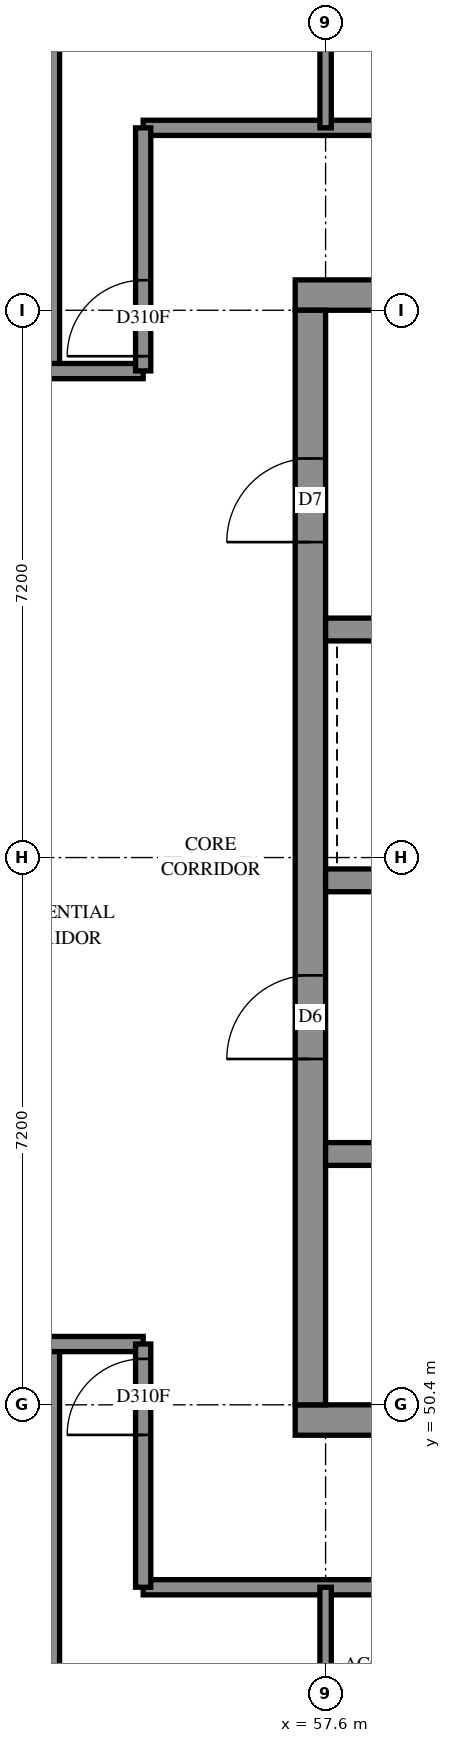
"""IFC4 building model, lengths in metres.
Left out: names, types, materials, properties, quantities, classifications, styles, units other than length and angle.
Written with IfcOpenShell. Run it as: python <this file> out.ifc"""

import sys

from ifc_helpers import new_model, si_unit, direction, frame, frame_2d, origin, place, context, subcontext, project, spatial, rectangle, extrude, element, fill, save


model = new_model("IFC4")
c1 = context("Model", 3, precision=1e-05, world=origin(), true_north=direction((0.0, 1.0)))
c2 = subcontext(c1, "Body", "Model", "MODEL_VIEW")
j1 = project(units=[si_unit("LENGTHUNIT", "METRE"), si_unit("PLANEANGLEUNIT", "RADIAN")], contexts=[c1])
p1 = place(None, origin())
s1 = spatial("IfcSite", under=j1, at=p1, CompositionType="ELEMENT")
p2 = place(p1, origin())
s2 = spatial("IfcBuilding", under=s1, at=p2, CompositionType="ELEMENT")
p3 = place(p2, frame((0.0, 0.0, 281.2)))
s3 = spatial("IfcBuildingStorey", under=s2, at=p3, CompositionType="ELEMENT", Elevation=281.2)
p4 = place(p3, frame((57.2, 50.2, -0.3), z_axis=(0.0, 0.0, 1.0), x_axis=(1.0, 0.0, 0.0)))
e1 = element("IfcWall", 1, at=p4, inside=s3, PredefinedType="SHEAR", context=c2, shape_type="SweptSolid", body=[
    extrude(rectangle(XDim=15.2, YDim=0.4, at=frame_2d((7.6, 0.0))), origin(), (0.0, 0.0, 1.0), 2.7),
])
p5 = place(p3, frame((57.2, 65.0, -0.3), z_axis=(0.0, 0.0, 1.0), x_axis=(1.0, 0.0, 0.0)))
e2 = element("IfcWall", 2, at=p5, inside=s3, PredefinedType="SHEAR", context=c2, shape_type="SweptSolid", body=[
    extrude(rectangle(XDim=15.2, YDim=0.4, at=frame_2d((7.6, 0.0))), origin(), (0.0, 0.0, 1.0), 2.7),
])
p6 = place(p5, frame((10.4, 0.0, 0.3)))
e3 = element("IfcOpeningElement", 3, at=p6, cuts=e2, PredefinedType="OPENING", context=c2, shape_type="SweptSolid", body=[
    extrude(rectangle(XDim=0.8, YDim=2.1, at=frame_2d((0.4, 1.05))), frame((0.0, 0.21, 0.0), z_axis=(0.0, -1.0, 0.0), x_axis=(1.0, 0.0, 0.0)), (0.0, 0.0, 1.0), 0.42),
])
p7 = place(p3, frame((57.4, 50.4, -0.3), z_axis=(0.0, 0.0, 1.0), x_axis=(0.0, 1.0, 0.0)))
e4 = element("IfcWall", 4, at=p7, inside=s3, PredefinedType="SHEAR", context=c2, shape_type="SweptSolid", body=[
    extrude(rectangle(XDim=14.4, YDim=0.4, at=frame_2d((7.2, 0.0))), origin(), (0.0, 0.0, 1.0), 2.7),
])
p8 = place(p7, frame((4.55, 0.0, 0.3)))
e5 = element("IfcOpeningElement", 5, at=p8, cuts=e4, PredefinedType="OPENING", context=c2, shape_type="SweptSolid", body=[
    extrude(rectangle(XDim=1.1, YDim=2.1, at=frame_2d((0.55, 1.05))), frame((0.0, 0.21, 0.0), z_axis=(0.0, -1.0, 0.0), x_axis=(1.0, 0.0, 0.0)), (0.0, 0.0, 1.0), 0.42),
])
p9 = place(p7, frame((11.35, 0.0, 0.3)))
e6 = element("IfcOpeningElement", 6, at=p9, cuts=e4, PredefinedType="OPENING", context=c2, shape_type="SweptSolid", body=[
    extrude(rectangle(XDim=1.1, YDim=2.1, at=frame_2d((0.55, 1.05))), frame((0.0, 0.21, 0.0), z_axis=(0.0, -1.0, 0.0), x_axis=(1.0, 0.0, 0.0)), (0.0, 0.0, 1.0), 0.42),
])
p10 = place(p3, frame((57.6, 53.7, 0.0), z_axis=(0.0, 0.0, 1.0), x_axis=(1.0, 0.0, 0.0)))
e7 = element("IfcWall", 7, at=p10, inside=s3, PredefinedType="SOLIDWALL", context=c2, shape_type="SweptSolid", body=[
    extrude(rectangle(XDim=14.4, YDim=0.3, at=frame_2d((7.2, 0.0))), origin(), (0.0, 0.0, 1.0), 3.1),
])
p11 = place(p10, frame((1.35, 0.0, 0.0)))
e8 = element("IfcOpeningElement", 8, at=p11, cuts=e7, PredefinedType="OPENING", context=c2, shape_type="SweptSolid", body=[
    extrude(rectangle(XDim=0.9, YDim=2.1, at=frame_2d((0.45, 1.05))), frame((0.0, 0.16, 0.0), z_axis=(0.0, -1.0, 0.0), x_axis=(1.0, 0.0, 0.0)), (0.0, 0.0, 1.0), 0.32),
])
p12 = place(p10, frame((4.95, 0.0, 0.0)))
e9 = element("IfcOpeningElement", 9, at=p12, cuts=e7, PredefinedType="OPENING", context=c2, shape_type="SweptSolid", body=[
    extrude(rectangle(XDim=0.9, YDim=2.1, at=frame_2d((0.45, 1.05))), frame((0.0, 0.16, 0.0), z_axis=(0.0, -1.0, 0.0), x_axis=(1.0, 0.0, 0.0)), (0.0, 0.0, 1.0), 0.32),
])
p13 = place(p10, frame((8.55, 0.0, 0.0)))
e10 = element("IfcOpeningElement", 10, at=p13, cuts=e7, PredefinedType="OPENING", context=c2, shape_type="SweptSolid", body=[
    extrude(rectangle(XDim=0.9, YDim=2.1, at=frame_2d((0.45, 1.05))), frame((0.0, 0.16, 0.0), z_axis=(0.0, -1.0, 0.0), x_axis=(1.0, 0.0, 0.0)), (0.0, 0.0, 1.0), 0.32),
])
p14 = place(p10, frame((12.05, 0.0, 0.0)))
e11 = element("IfcOpeningElement", 11, at=p14, cuts=e7, PredefinedType="OPENING", context=c2, shape_type="SweptSolid", body=[
    extrude(rectangle(XDim=1.1, YDim=2.1, at=frame_2d((0.55, 1.05))), frame((0.0, 0.16, 0.0), z_axis=(0.0, -1.0, 0.0), x_axis=(1.0, 0.0, 0.0)), (0.0, 0.0, 1.0), 0.32),
])
p15 = place(p3, frame((57.6, 57.3, 0.0), z_axis=(0.0, 0.0, 1.0), x_axis=(1.0, 0.0, 0.0)))
e12 = element("IfcWall", 12, at=p15, inside=s3, PredefinedType="SOLIDWALL", context=c2, shape_type="SweptSolid", body=[
    extrude(rectangle(XDim=14.4, YDim=0.3, at=frame_2d((7.2, 0.0))), origin(), (0.0, 0.0, 1.0), 3.1),
])
p16 = place(p15, frame((8.55, 0.0, 0.0)))
e13 = element("IfcOpeningElement", 13, at=p16, cuts=e12, PredefinedType="OPENING", context=c2, shape_type="SweptSolid", body=[
    extrude(rectangle(XDim=0.9, YDim=2.1, at=frame_2d((0.45, 1.05))), frame((0.0, 0.16, 0.0), z_axis=(0.0, -1.0, 0.0), x_axis=(1.0, 0.0, 0.0)), (0.0, 0.0, 1.0), 0.32),
])
p17 = place(p15, frame((1.25, 0.0, 0.0)))
e14 = element("IfcOpeningElement", 14, at=p17, cuts=e12, PredefinedType="OPENING", context=c2, shape_type="SweptSolid", body=[
    extrude(rectangle(XDim=1.1, YDim=2.1, at=frame_2d((0.55, 1.05))), frame((0.0, 0.16, 0.0), z_axis=(0.0, -1.0, 0.0), x_axis=(1.0, 0.0, 0.0)), (0.0, 0.0, 1.0), 0.32),
])
p18 = place(p15, frame((4.85, 0.0, 0.0)))
e15 = element("IfcOpeningElement", 15, at=p18, cuts=e12, PredefinedType="OPENING", context=c2, shape_type="SweptSolid", body=[
    extrude(rectangle(XDim=1.1, YDim=2.1, at=frame_2d((0.55, 1.05))), frame((0.0, 0.16, 0.0), z_axis=(0.0, -1.0, 0.0), x_axis=(1.0, 0.0, 0.0)), (0.0, 0.0, 1.0), 0.32),
])
p19 = place(p15, frame((12.05, 0.0, 0.0)))
e16 = element("IfcOpeningElement", 16, at=p19, cuts=e12, PredefinedType="OPENING", context=c2, shape_type="SweptSolid", body=[
    extrude(rectangle(XDim=1.1, YDim=2.1, at=frame_2d((0.55, 1.05))), frame((0.0, 0.16, 0.0), z_axis=(0.0, -1.0, 0.0), x_axis=(1.0, 0.0, 0.0)), (0.0, 0.0, 1.0), 0.32),
])
p20 = place(p3, frame((57.6, 60.6, 0.0), z_axis=(0.0, 0.0, 1.0), x_axis=(1.0, 0.0, 0.0)))
e17 = element("IfcWall", 17, at=p20, inside=s3, PredefinedType="SOLIDWALL", context=c2, shape_type="SweptSolid", body=[
    extrude(rectangle(XDim=7.2, YDim=0.3, at=frame_2d((3.6, 0.0))), origin(), (0.0, 0.0, 1.0), 3.1),
])
p21 = place(p3, frame((55.2, 67.2, 0.0), z_axis=(0.0, 0.0, 1.0), x_axis=(1.0, 0.0, 0.0)))
e18 = element("IfcWall", 18, at=p21, inside=s3, PredefinedType="PARTITIONING", context=c2, shape_type="SweptSolid", body=[
    extrude(rectangle(XDim=19.2, YDim=0.2, at=frame_2d((9.6, 0.0))), origin(), (0.0, 0.0, 1.0), 3.1),
])
p22 = place(p21, frame((6.299, 0.0, 0.0)))
e19 = element("IfcOpeningElement", 19, at=p22, cuts=e18, PredefinedType="OPENING", context=c2, shape_type="SweptSolid", body=[
    extrude(rectangle(XDim=0.9, YDim=2.1, at=frame_2d((0.45, 1.05))), frame((0.0, 0.11, 0.0), z_axis=(0.0, -1.0, 0.0), x_axis=(1.0, 0.0, 0.0)), (0.0, 0.0, 1.0), 0.22),
])
p23 = place(p21, frame((13.65, 0.0, 0.0)))
e20 = element("IfcOpeningElement", 20, at=p23, cuts=e18, PredefinedType="OPENING", context=c2, shape_type="SweptSolid", body=[
    extrude(rectangle(XDim=0.9, YDim=2.1, at=frame_2d((0.45, 1.05))), frame((0.0, 0.11, 0.0), z_axis=(0.0, -1.0, 0.0), x_axis=(1.0, 0.0, 0.0)), (0.0, 0.0, 1.0), 0.22),
])
p24 = place(p3, frame((55.2, 48.0, 0.0), z_axis=(0.0, 0.0, 1.0), x_axis=(1.0, 0.0, 0.0)))
e21 = element("IfcWall", 21, at=p24, inside=s3, PredefinedType="PARTITIONING", context=c2, shape_type="SweptSolid", body=[
    extrude(rectangle(XDim=19.15, YDim=0.2, at=frame_2d((9.575, 0.0))), origin(), (0.0, 0.0, 1.0), 3.1),
])
p25 = place(p24, frame((6.243, 0.0, 0.0)))
e22 = element("IfcOpeningElement", 22, at=p25, cuts=e21, PredefinedType="OPENING", context=c2, shape_type="SweptSolid", body=[
    extrude(rectangle(XDim=0.9, YDim=2.1, at=frame_2d((0.45, 1.05))), frame((0.0, 0.11, 0.0), z_axis=(0.0, -1.0, 0.0), x_axis=(1.0, 0.0, 0.0)), (0.0, 0.0, 1.0), 0.22),
])
p26 = place(p24, frame((11.675, 0.0, 0.0)))
e23 = element("IfcOpeningElement", 23, at=p26, cuts=e21, PredefinedType="OPENING", context=c2, shape_type="SweptSolid", body=[
    extrude(rectangle(XDim=1.0, YDim=2.1, at=frame_2d((0.5, 1.05))), frame((0.0, 0.11, 0.0), z_axis=(0.0, -1.0, 0.0), x_axis=(1.0, 0.0, 0.0)), (0.0, 0.0, 1.0), 0.22),
])
p27 = place(p24, frame((13.707, 0.0, 0.0)))
e24 = element("IfcOpeningElement", 24, at=p27, cuts=e21, PredefinedType="OPENING", context=c2, shape_type="SweptSolid", body=[
    extrude(rectangle(XDim=1.0, YDim=2.1, at=frame_2d((0.5, 1.05))), frame((0.0, 0.11, 0.0), z_axis=(0.0, -1.0, 0.0), x_axis=(1.0, 0.0, 0.0)), (0.0, 0.0, 1.0), 0.22),
])
p28 = place(p3, frame((54.0, 64.0, 0.0), z_axis=(0.0, 0.0, 1.0), x_axis=(0.0, 1.0, 0.0)))
e25 = element("IfcWall", 25, at=p28, inside=s3, PredefinedType="PARTITIONING", context=c2, shape_type="SweptSolid", body=[
    extrude(rectangle(XDim=8.862, YDim=0.2, at=frame_2d((4.431, 0.0))), origin(), (0.0, 0.0, 1.0), 3.1),
])
p29 = place(p3, frame((54.0, 42.45, 0.0), z_axis=(0.0, 0.0, 1.0), x_axis=(0.0, 1.0, 0.0)))
e26 = element("IfcWall", 26, at=p29, inside=s3, PredefinedType="PARTITIONING", context=c2, shape_type="SweptSolid", body=[
    extrude(rectangle(XDim=8.75, YDim=0.2, at=frame_2d((4.375, 0.0))), origin(), (0.0, 0.0, 1.0), 3.1),
])
p30 = place(p3, frame((50.4, 51.2, 0.0), z_axis=(0.0, 0.0, 1.0), x_axis=(1.0, 0.0, 0.0)))
e27 = element("IfcWall", 27, at=p30, inside=s3, PredefinedType="PARTITIONING", context=c2, shape_type="SweptSolid", body=[
    extrude(rectangle(XDim=4.8, YDim=0.2, at=frame_2d((2.4, 0.0))), origin(), (0.0, 0.0, 1.0), 3.1),
])
p31 = place(p30, frame((2.075, 0.0, 0.0)))
e28 = element("IfcOpeningElement", 28, at=p31, cuts=e27, PredefinedType="OPENING", context=c2, shape_type="SweptSolid", body=[
    extrude(rectangle(XDim=1.0, YDim=2.1, at=frame_2d((0.5, 1.05))), frame((0.0, 0.11, 0.0), z_axis=(0.0, -1.0, 0.0), x_axis=(1.0, 0.0, 0.0)), (0.0, 0.0, 1.0), 0.22),
])
p32 = place(p3, frame((50.4, 64.0, 0.0), z_axis=(0.0, 0.0, 1.0), x_axis=(1.0, 0.0, 0.0)))
e29 = element("IfcWall", 29, at=p32, inside=s3, PredefinedType="PARTITIONING", context=c2, shape_type="SweptSolid", body=[
    extrude(rectangle(XDim=4.8, YDim=0.2, at=frame_2d((2.4, 0.0))), origin(), (0.0, 0.0, 1.0), 3.1),
])
p33 = place(p32, frame((2.075, 0.0, 0.0)))
e30 = element("IfcOpeningElement", 30, at=p33, cuts=e29, PredefinedType="OPENING", context=c2, shape_type="SweptSolid", body=[
    extrude(rectangle(XDim=1.0, YDim=2.1, at=frame_2d((0.5, 1.05))), frame((0.0, 0.11, 0.0), z_axis=(0.0, -1.0, 0.0), x_axis=(1.0, 0.0, 0.0)), (0.0, 0.0, 1.0), 0.22),
])
p34 = place(p3, frame((55.2, 48.0, 0.0), z_axis=(0.0, 0.0, 1.0), x_axis=(0.0, 1.0, 0.0)))
e31 = element("IfcWall", 31, at=p34, inside=s3, PredefinedType="PARTITIONING", context=c2, shape_type="SweptSolid", body=[
    extrude(rectangle(XDim=3.2, YDim=0.2, at=frame_2d((1.6, 0.0))), origin(), (0.0, 0.0, 1.0), 3.1),
])
p35 = place(p34, frame((2.004, 0.0, 0.0)))
e32 = element("IfcOpeningElement", 32, at=p35, cuts=e31, PredefinedType="OPENING", context=c2, shape_type="SweptSolid", body=[
    extrude(rectangle(XDim=1.0, YDim=2.1, at=frame_2d((0.5, 1.05))), frame((0.0, 0.11, 0.0), z_axis=(0.0, -1.0, 0.0), x_axis=(1.0, 0.0, 0.0)), (0.0, 0.0, 1.0), 0.22),
])
p36 = place(p3, frame((55.2, 64.002, 0.0), z_axis=(0.0, 0.0, 1.0), x_axis=(0.0, 1.0, 0.0)))
e33 = element("IfcWall", 33, at=p36, inside=s3, PredefinedType="PARTITIONING", context=c2, shape_type="SweptSolid", body=[
    extrude(rectangle(XDim=3.198, YDim=0.2, at=frame_2d((1.599, 0.0))), origin(), (0.0, 0.0, 1.0), 3.1),
])
p37 = place(p36, frame((0.194, 0.0, 0.0)))
e34 = element("IfcOpeningElement", 34, at=p37, cuts=e33, PredefinedType="OPENING", context=c2, shape_type="SweptSolid", body=[
    extrude(rectangle(XDim=1.0, YDim=2.1, at=frame_2d((0.5, 1.05))), frame((0.0, 0.11, 0.0), z_axis=(0.0, -1.0, 0.0), x_axis=(1.0, 0.0, 0.0)), (0.0, 0.0, 1.0), 0.22),
])
for number, where, z_axis, x_axis in (
    (35, (57.6, 45.6, 0.0), (0.0, 0.0, 1.0), (0.0, 1.0, 0.0)),
    (36, (57.6, 67.2, 0.0), (0.0, 0.0, 1.0), (0.0, 1.0, 0.0)),
):
    element("IfcWall", number, at=place(p3, frame(where, z_axis=z_axis, x_axis=x_axis)), inside=s3, PredefinedType="PARTITIONING", context=c2, shape_type="SweptSolid", body=[
        extrude(rectangle(XDim=2.4, YDim=0.15, at=frame_2d((1.2, 0.0))), origin(), (0.0, 0.0, 1.0), 3.1),
    ])
p38 = place(p8, origin())
e37 = element("IfcDoor", 37, at=p38, inside=s3, OperationType="DOUBLE_DOOR_SINGLE_SWING", PredefinedType="DOOR", context=c2, shape_type="SweptSolid", body=[
    extrude(rectangle(XDim=1.1, YDim=2.1, at=frame_2d((0.55, 1.05))), frame((0.0, 0.025, 0.0), z_axis=(0.0, -1.0, 0.0), x_axis=(1.0, 0.0, 0.0)), (0.0, 0.0, 1.0), 0.05),
])
fill(e5, e37)
p39 = place(p9, origin())
e38 = element("IfcDoor", 38, at=p39, inside=s3, OperationType="SINGLE_SWING_LEFT", PredefinedType="DOOR", context=c2, shape_type="SweptSolid", body=[
    extrude(rectangle(XDim=1.1, YDim=2.1, at=frame_2d((0.55, 1.05))), frame((0.0, 0.025, 0.0), z_axis=(0.0, -1.0, 0.0), x_axis=(1.0, 0.0, 0.0)), (0.0, 0.0, 1.0), 0.05),
])
fill(e6, e38)
p40 = place(p37, origin())
e39 = element("IfcDoor", 39, at=p40, inside=s3, OperationType="SINGLE_SWING_LEFT", PredefinedType="DOOR", context=c2, shape_type="SweptSolid", body=[
    extrude(rectangle(XDim=1.0, YDim=2.1, at=frame_2d((0.5, 1.05))), frame((0.0, 0.025, 0.0), z_axis=(0.0, -1.0, 0.0), x_axis=(1.0, 0.0, 0.0)), (0.0, 0.0, 1.0), 0.05),
])
fill(e34, e39)
p41 = place(p35, origin())
e40 = element("IfcDoor", 40, at=p41, inside=s3, OperationType="SINGLE_SWING_RIGHT", PredefinedType="DOOR", context=c2, shape_type="SweptSolid", body=[
    extrude(rectangle(XDim=1.0, YDim=2.1, at=frame_2d((0.5, 1.05))), frame((0.0, 0.025, 0.0), z_axis=(0.0, -1.0, 0.0), x_axis=(1.0, 0.0, 0.0)), (0.0, 0.0, 1.0), 0.05),
])
fill(e32, e40)
save(model, sys.argv[1])
